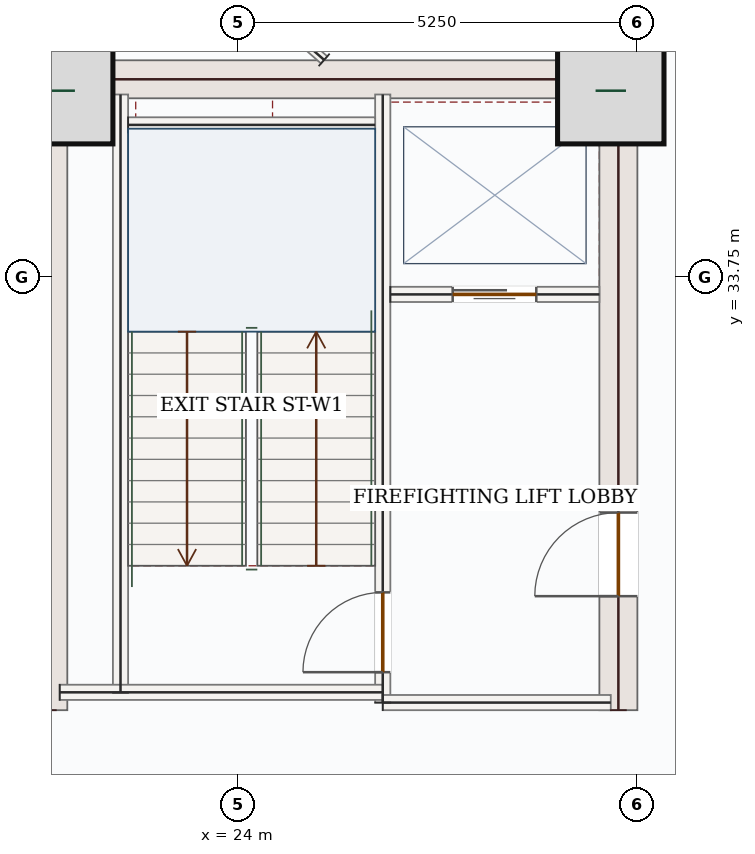
"""IFC4 building model, lengths in metres.
Left out: names, types, materials, properties, quantities, classifications, styles, units other than length and angle.
Written with IfcOpenShell. Run it as: python <this file> out.ifc"""

import sys

from ifc_helpers import new_model, si_unit, direction, frame, frame_2d, origin, origin_2d, place, context, subcontext, project, spatial, rectangle, extrude, source, transform, mapped, element, fill, save


model = new_model("IFC4")
c1 = context("Model", 3, precision=1e-05, world=origin(), true_north=direction((0.0, 1.0)))
c2 = subcontext(c1, "Body", "Model", "MODEL_VIEW")
j1 = project(units=[si_unit("LENGTHUNIT", "METRE"), si_unit("PLANEANGLEUNIT", "RADIAN")], contexts=[c1])
p1 = place(None, origin())
s1 = spatial("IfcSite", under=j1, at=p1, CompositionType="ELEMENT")
p2 = place(p1, origin())
s2 = spatial("IfcBuilding", under=s1, at=p2, CompositionType="ELEMENT")
p3 = place(p2, frame((0.0, 0.0, 71.1)))
s3 = spatial("IfcBuildingStorey", under=s2, at=p3, CompositionType="ELEMENT", Elevation=71.1)
m1 = source(origin(), c2, "Body", "SweptSolid", [
    extrude(rectangle(XDim=8.55, YDim=0.5, at=frame_2d((4.275, 0.0))), origin(), (0.0, 0.0, 1.0), 3.95),
])
p4 = place(p3, frame((21.5, 28.05, 0.0), z_axis=(0.0, 0.0, 1.0), x_axis=(0.0, 1.0, 0.0)))
e1 = element("IfcWall", 1, at=p4, inside=s3, PredefinedType="SHEAR", context=c2, shape_type="MappedRepresentation", body=[
    mapped(m1, transform((0.0, 0.0, 0.0), x_axis=(1.0, 0.0, 0.0), y_axis=(0.0, 1.0, 0.0), z_axis=(0.0, 0.0, 1.0), scale=1.0)),
])
p5 = place(p3, frame((29.0, 28.05, 0.0), z_axis=(0.0, 0.0, 1.0), x_axis=(0.0, 1.0, 0.0)))
e2 = element("IfcWall", 2, at=p5, inside=s3, PredefinedType="SHEAR", context=c2, shape_type="SweptSolid", body=[
    extrude(rectangle(XDim=8.55, YDim=0.5, at=frame_2d((4.275, 0.0))), origin(), (0.0, 0.0, 1.0), 3.95),
])
p6 = place(p5, frame((1.5, 0.0, 0.0)))
e3 = element("IfcOpeningElement", 3, at=p6, cuts=e2, PredefinedType="OPENING", context=c2, shape_type="SweptSolid", body=[
    extrude(rectangle(XDim=1.1, YDim=2.2, at=frame_2d((0.55, 1.1))), frame((0.0, 0.26, 0.0), z_axis=(0.0, -1.0, 0.0), x_axis=(1.0, 0.0, 0.0)), (0.0, 0.0, 1.0), 0.52),
])
m2 = source(origin(), c2, "Body", "SweptSolid", [
    extrude(rectangle(XDim=7.0, YDim=0.5, at=frame_2d((3.5, 0.0))), origin(), (0.0, 0.0, 1.0), 3.95),
])
p7 = place(p3, frame((21.75, 36.35, 0.0), z_axis=(0.0, 0.0, 1.0), x_axis=(1.0, 0.0, 0.0)))
e4 = element("IfcWall", 4, at=p7, inside=s3, PredefinedType="SHEAR", context=c2, shape_type="MappedRepresentation", body=[
    mapped(m2, transform((0.0, 0.0, 0.0), x_axis=(1.0, 0.0, 0.0), y_axis=(0.0, 1.0, 0.0), z_axis=(0.0, 0.0, 1.0), scale=1.0)),
])
m3 = source(origin(), c2, "Body", "SweptSolid", [
    extrude(rectangle(XDim=1.4, YDim=1.4, at=origin_2d()), origin(), (0.0, 0.0, 1.0), 4.2),
])
for number, where, z_axis, x_axis in (
    (5, (21.65, 36.2, 0.0), (0.0, 0.0, 1.0), (1.0, 0.0, 0.0)),
    (6, (28.9, 36.2, 0.0), (0.0, 0.0, 1.0), (1.0, 0.0, 0.0)),
):
    element("IfcColumn", number, at=place(p3, frame(where, z_axis=z_axis, x_axis=x_axis)), inside=s3, PredefinedType="COLUMN", context=c2, shape_type="MappedRepresentation", body=[
        mapped(m3, transform((0.0, 0.0, 0.0), x_axis=(1.0, 0.0, 0.0), y_axis=(0.0, 1.0, 0.0), z_axis=(0.0, 0.0, 1.0), scale=1.0)),
    ])
m4 = source(origin(), c2, "Body", "SweptSolid", [
    extrude(rectangle(XDim=5.258, YDim=0.32, at=frame_2d((2.629, 0.0))), origin(), (0.0, 0.0, 1.0), 3.95),
])
p8 = place(p3, frame((18.94, 35.542, 0.0), z_axis=(0.0, 0.0, 1.0), x_axis=(0.707106781187, 0.707106781187, 0.0)))
e7 = element("IfcWall", 7, at=p8, inside=s3, PredefinedType="SOLIDWALL", context=c2, shape_type="MappedRepresentation", body=[
    mapped(m4, transform((0.0, 0.0, 0.0), x_axis=(1.0, 0.0, 0.0), y_axis=(0.0, 1.0, 0.0), z_axis=(0.0, 0.0, 1.0), scale=1.0)),
])
m5 = source(origin(), c2, "Body", "SweptSolid", [
    extrude(rectangle(XDim=7.87, YDim=0.2, at=frame_2d((3.935, 0.0))), origin(), (0.0, 0.0, 1.0), 3.95),
])
p9 = place(p3, frame((22.45, 28.28, 0.0), z_axis=(0.0, 0.0, 1.0), x_axis=(0.0, 1.0, 0.0)))
e8 = element("IfcWall", 8, at=p9, inside=s3, PredefinedType="SOLIDWALL", context=c2, shape_type="MappedRepresentation", body=[
    mapped(m5, transform((0.0, 0.0, 0.0), x_axis=(1.0, 0.0, 0.0), y_axis=(0.0, 1.0, 0.0), z_axis=(0.0, 0.0, 1.0), scale=1.0)),
])
p10 = place(p3, frame((25.9, 28.15, 0.0), z_axis=(0.0, 0.0, 1.0), x_axis=(0.0, 1.0, 0.0)))
e9 = element("IfcWall", 9, at=p10, inside=s3, PredefinedType="SOLIDWALL", context=c2, shape_type="SweptSolid", body=[
    extrude(rectangle(XDim=8.0, YDim=0.2, at=frame_2d((4.0, 0.0))), origin(), (0.0, 0.0, 1.0), 3.95),
])
p11 = place(p10, frame((0.4, 0.0, 0.0)))
e10 = element("IfcOpeningElement", 10, at=p11, cuts=e9, PredefinedType="OPENING", context=c2, shape_type="SweptSolid", body=[
    extrude(rectangle(XDim=1.05, YDim=2.15, at=frame_2d((0.525, 1.075))), frame((0.0, 0.11, 0.0), z_axis=(0.0, -1.0, 0.0), x_axis=(1.0, 0.0, 0.0)), (0.0, 0.0, 1.0), 0.22),
])
m6 = source(origin(), c2, "Body", "SweptSolid", [
    extrude(rectangle(XDim=4.25, YDim=0.2, at=frame_2d((2.125, 0.0))), origin(), (0.0, 0.0, 1.0), 3.95),
])
p12 = place(p3, frame((21.65, 28.285, 0.0), z_axis=(0.0, 0.0, 1.0), x_axis=(1.0, 0.0, 0.0)))
e11 = element("IfcWall", 11, at=p12, inside=s3, PredefinedType="SOLIDWALL", context=c2, shape_type="MappedRepresentation", body=[
    mapped(m6, transform((0.0, 0.0, 0.0), x_axis=(1.0, 0.0, 0.0), y_axis=(0.0, 1.0, 0.0), z_axis=(0.0, 0.0, 1.0), scale=1.0)),
])
m7 = source(origin(), c2, "Body", "SweptSolid", [
    extrude(rectangle(XDim=3.0, YDim=0.2, at=frame_2d((1.5, 0.0))), origin(), (0.0, 0.0, 1.0), 3.95),
])
p13 = place(p3, frame((25.9, 28.15, 0.0), z_axis=(0.0, 0.0, 1.0), x_axis=(1.0, 0.0, 0.0)))
e12 = element("IfcWall", 12, at=p13, inside=s3, PredefinedType="SOLIDWALL", context=c2, shape_type="MappedRepresentation", body=[
    mapped(m7, transform((0.0, 0.0, 0.0), x_axis=(1.0, 0.0, 0.0), y_axis=(0.0, 1.0, 0.0), z_axis=(0.0, 0.0, 1.0), scale=1.0)),
])
m8 = source(origin(), c2, "Body", "SweptSolid", [
    extrude(rectangle(XDim=3.25, YDim=0.2, at=frame_2d((1.625, 0.0))), origin(), (0.0, 0.0, 1.0), 3.95),
])
p14 = place(p3, frame((22.55, 35.75, 0.0), z_axis=(0.0, 0.0, 1.0), x_axis=(1.0, 0.0, 0.0)))
e13 = element("IfcWall", 13, at=p14, inside=s3, PredefinedType="SOLIDWALL", context=c2, shape_type="MappedRepresentation", body=[
    mapped(m8, transform((0.0, 0.0, 0.0), x_axis=(1.0, 0.0, 0.0), y_axis=(0.0, 1.0, 0.0), z_axis=(0.0, 0.0, 1.0), scale=1.0)),
])
p15 = place(p3, frame((26.0, 33.52, 0.0), z_axis=(0.0, 0.0, 1.0), x_axis=(1.0, 0.0, 0.0)))
e14 = element("IfcWall", 14, at=p15, inside=s3, PredefinedType="SOLIDWALL", context=c2, shape_type="SweptSolid", body=[
    extrude(rectangle(XDim=2.75, YDim=0.2, at=frame_2d((1.375, 0.0))), origin(), (0.0, 0.0, 1.0), 3.95),
])
p16 = place(p15, frame((0.82, 0.0, 0.0)))
e15 = element("IfcOpeningElement", 15, at=p16, cuts=e14, PredefinedType="OPENING", context=c2, shape_type="SweptSolid", body=[
    extrude(rectangle(XDim=1.1, YDim=2.15, at=frame_2d((0.55, 1.075))), frame((0.0, 0.11, 0.0), z_axis=(0.0, -1.0, 0.0), x_axis=(1.0, 0.0, 0.0)), (0.0, 0.0, 1.0), 0.22),
])
m9 = source(origin(), c2, "Body", "SweptSolid", [
    extrude(rectangle(XDim=3.467, YDim=0.125, at=frame_2d((1.733, 0.0))), origin(), (0.0, 0.0, 1.0), 3.95),
])
p17 = place(p3, frame((25.129, 36.605, 0.0), z_axis=(0.0, 0.0, 1.0), x_axis=(-0.751135268809, 0.66014832269, 0.0)))
e16 = element("IfcWall", 16, at=p17, inside=s3, PredefinedType="PARTITIONING", context=c2, shape_type="MappedRepresentation", body=[
    mapped(m9, transform((0.0, 0.0, 0.0), x_axis=(1.0, 0.0, 0.0), y_axis=(0.0, 1.0, 0.0), z_axis=(0.0, 0.0, 1.0), scale=1.0)),
])
m10 = source(origin(), c2, "Body", "SweptSolid", [
    extrude(rectangle(XDim=1.05, YDim=2.15, at=frame_2d((0.525, 1.075))), frame((0.0, 0.025, 0.0), z_axis=(0.0, -1.0, 0.0), x_axis=(1.0, 0.0, 0.0)), (0.0, 0.0, 1.0), 0.05),
])
p18 = place(p11, origin())
e17 = element("IfcDoor", 17, at=p18, inside=s3, OperationType="SINGLE_SWING_LEFT", PredefinedType="DOOR", context=c2, shape_type="MappedRepresentation", body=[
    mapped(m10, transform((0.0, 0.0, 0.0), x_axis=(1.0, 0.0, 0.0), y_axis=(0.0, 1.0, 0.0), z_axis=(0.0, 0.0, 1.0), scale=1.0)),
])
fill(e10, e17)
m11 = source(origin(), c2, "Body", "SweptSolid", [
    extrude(rectangle(XDim=1.1, YDim=2.15, at=frame_2d((0.55, 1.075))), frame((0.0, 0.025, 0.0), z_axis=(0.0, -1.0, 0.0), x_axis=(1.0, 0.0, 0.0)), (0.0, 0.0, 1.0), 0.05),
])
p19 = place(p16, origin())
e18 = element("IfcDoor", 18, at=p19, inside=s3, OperationType="DOUBLE_DOOR_SLIDING", PredefinedType="DOOR", context=c2, shape_type="MappedRepresentation", body=[
    mapped(m11, transform((0.0, 0.0, 0.0), x_axis=(1.0, 0.0, 0.0), y_axis=(0.0, 1.0, 0.0), z_axis=(0.0, 0.0, 1.0), scale=1.0)),
])
fill(e15, e18)
m12 = source(origin(), c2, "Body", "SweptSolid", [
    extrude(rectangle(XDim=1.1, YDim=2.2, at=frame_2d((0.55, 1.1))), frame((0.0, 0.025, 0.0), z_axis=(0.0, -1.0, 0.0), x_axis=(1.0, 0.0, 0.0)), (0.0, 0.0, 1.0), 0.05),
])
p20 = place(p6, origin())
e19 = element("IfcDoor", 19, at=p20, inside=s3, OperationType="SINGLE_SWING_LEFT", PredefinedType="DOOR", context=c2, shape_type="MappedRepresentation", body=[
    mapped(m12, transform((0.0, 0.0, 0.0), x_axis=(1.0, 0.0, 0.0), y_axis=(0.0, 1.0, 0.0), z_axis=(0.0, 0.0, 1.0), scale=1.0)),
])
fill(e3, e19)
save(model, sys.argv[1])
